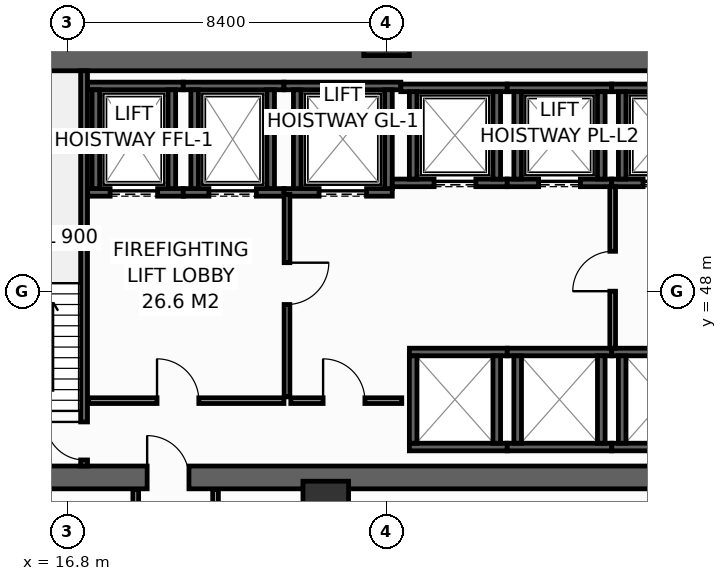
"""IFC4 building model, lengths in metres.
Left out: names, types, materials, properties, quantities, classifications, styles, units other than length and angle.
Written with IfcOpenShell. Run it as: python <this file> out.ifc"""

import sys

from ifc_helpers import new_model, si_unit, direction, frame, frame_2d, origin, origin_2d, place, context, subcontext, project, spatial, rectangle, hollow_rectangle, extrude, element, fill, save


model = new_model("IFC4")
c1 = context("Model", 3, precision=1e-05, world=origin(), true_north=direction((0.0, 1.0)))
c2 = subcontext(c1, "Body", "Model", "MODEL_VIEW")
j1 = project(units=[si_unit("LENGTHUNIT", "METRE"), si_unit("PLANEANGLEUNIT", "RADIAN")], contexts=[c1])
p1 = place(None, origin())
s1 = spatial("IfcSite", under=j1, at=p1, CompositionType="ELEMENT")
p2 = place(p1, origin())
s2 = spatial("IfcBuilding", under=s1, at=p2, CompositionType="ELEMENT")
p3 = place(p2, frame((0.0, 0.0, 73.6)))
s3 = spatial("IfcBuildingStorey", under=s2, at=p3, CompositionType="ELEMENT", Elevation=73.6)
p4 = place(p3, frame((13.5, 43.1, 0.0), z_axis=(0.0, 0.0, 1.0), x_axis=(1.0, 0.0, 0.0)))
e1 = element("IfcWall", 1, at=p4, inside=s3, PredefinedType="SHEAR", context=c2, shape_type="SweptSolid", body=[
    extrude(rectangle(XDim=32.9, YDim=0.6, at=frame_2d((16.45, 0.0))), origin(), (0.0, 0.0, 1.0), 4.15),
])
p5 = place(p4, frame((5.4, 0.0, 0.0)))
e2 = element("IfcOpeningElement", 2, at=p5, cuts=e1, PredefinedType="OPENING", context=c2, shape_type="SweptSolid", body=[
    extrude(rectangle(XDim=1.1, YDim=2.15, at=frame_2d((0.55, 1.075))), frame((0.0, 0.31, 0.0), z_axis=(0.0, -1.0, 0.0), x_axis=(1.0, 0.0, 0.0)), (0.0, 0.0, 1.0), 0.62),
])
p6 = place(p4, frame((25.6, 0.0, 0.0)))
e3 = element("IfcOpeningElement", 3, at=p6, cuts=e1, PredefinedType="OPENING", context=c2, shape_type="SweptSolid", body=[
    extrude(rectangle(XDim=1.1, YDim=2.15, at=frame_2d((0.55, 1.075))), frame((0.0, 0.31, 0.0), z_axis=(0.0, -1.0, 0.0), x_axis=(1.0, 0.0, 0.0)), (0.0, 0.0, 1.0), 0.62),
])
p7 = place(p3, frame((13.5, 54.1, 0.0), z_axis=(0.0, 0.0, 1.0), x_axis=(1.0, 0.0, 0.0)))
e4 = element("IfcWall", 4, at=p7, inside=s3, PredefinedType="SHEAR", context=c2, shape_type="SweptSolid", body=[
    extrude(rectangle(XDim=32.9, YDim=0.6, at=frame_2d((16.45, 0.0))), origin(), (0.0, 0.0, 1.0), 4.15),
])
for number, where, z_axis, x_axis in (
    (5, (25.2, 54.8, 0.0), (0.0, 0.0, 1.0), (1.0, 0.0, 0.0)),
    (6, (23.6, 42.4, 0.0), (0.0, 0.0, 1.0), (1.0, 0.0, 0.0)),
):
    element("IfcColumn", number, at=place(p3, frame(where, z_axis=z_axis, x_axis=x_axis)), inside=s3, PredefinedType="COLUMN", context=c2, shape_type="SweptSolid", body=[
        extrude(hollow_rectangle(XDim=1.2, YDim=1.2, WallThickness=0.055, at=origin_2d()), origin(), (0.0, 0.0, 1.0), 4.4),
    ])
p8 = place(p3, frame((17.33, 50.6, 0.0), z_axis=(0.0, 0.0, 1.0), x_axis=(1.0, 0.0, 0.0)))
e7 = element("IfcWall", 7, at=p8, inside=s3, PredefinedType="SHEAR", context=c2, shape_type="SweptSolid", body=[
    extrude(rectangle(XDim=2.52, YDim=0.2, at=frame_2d((1.26, 0.0))), origin(), (0.0, 0.0, 1.0), 4.15),
])
p9 = place(p8, frame((0.595, 0.0, 0.0)))
e8 = element("IfcOpeningElement", 8, at=p9, cuts=e7, PredefinedType="OPENING", context=c2, shape_type="SweptSolid", body=[
    extrude(rectangle(XDim=1.25, YDim=2.3, at=frame_2d((0.625, 1.15))), frame((0.0, 0.11, 0.0), z_axis=(0.0, -1.0, 0.0), x_axis=(1.0, 0.0, 0.0)), (0.0, 0.0, 1.0), 0.22),
])
p10 = place(p3, frame((17.33, 53.4, 0.0), z_axis=(0.0, 0.0, 1.0), x_axis=(1.0, 0.0, 0.0)))
e9 = element("IfcWall", 9, at=p10, inside=s3, PredefinedType="SHEAR", context=c2, shape_type="SweptSolid", body=[
    extrude(rectangle(XDim=2.52, YDim=0.2, at=frame_2d((1.26, 0.0))), origin(), (0.0, 0.0, 1.0), 4.15),
])
for number, where, z_axis, x_axis in (
    (10, (17.55, 50.7, 0.0), (0.0, 0.0, 1.0), (0.0, 1.0, 0.0)),
    (11, (19.55, 50.7, 0.0), (0.0, 0.0, 1.0), (0.0, 1.0, 0.0)),
):
    element("IfcWall", number, at=place(p3, frame(where, z_axis=z_axis, x_axis=x_axis)), inside=s3, PredefinedType="SHEAR", context=c2, shape_type="SweptSolid", body=[
        extrude(rectangle(XDim=2.6, YDim=0.2, at=frame_2d((1.3, 0.0))), origin(), (0.0, 0.0, 1.0), 4.15),
    ])
p11 = place(p3, frame((19.85, 50.6, 0.0), z_axis=(0.0, 0.0, 1.0), x_axis=(1.0, 0.0, 0.0)))
e12 = element("IfcWall", 12, at=p11, inside=s3, PredefinedType="SHEAR", context=c2, shape_type="SweptSolid", body=[
    extrude(rectangle(XDim=2.65, YDim=0.2, at=frame_2d((1.325, 0.0))), origin(), (0.0, 0.0, 1.0), 4.15),
])
p12 = place(p11, frame((0.675, 0.0, 0.0)))
e13 = element("IfcOpeningElement", 13, at=p12, cuts=e12, PredefinedType="OPENING", context=c2, shape_type="SweptSolid", body=[
    extrude(rectangle(XDim=1.25, YDim=2.3, at=frame_2d((0.625, 1.15))), frame((0.0, 0.11, 0.0), z_axis=(0.0, -1.0, 0.0), x_axis=(1.0, 0.0, 0.0)), (0.0, 0.0, 1.0), 0.22),
])
p13 = place(p3, frame((19.85, 53.4, 0.0), z_axis=(0.0, 0.0, 1.0), x_axis=(1.0, 0.0, 0.0)))
e14 = element("IfcWall", 14, at=p13, inside=s3, PredefinedType="SHEAR", context=c2, shape_type="SweptSolid", body=[
    extrude(rectangle(XDim=2.65, YDim=0.2, at=frame_2d((1.325, 0.0))), origin(), (0.0, 0.0, 1.0), 4.15),
])
for number, where, z_axis, x_axis in (
    (15, (20.15, 50.7, 0.0), (0.0, 0.0, 1.0), (0.0, 1.0, 0.0)),
    (16, (22.15, 50.7, 0.0), (0.0, 0.0, 1.0), (0.0, 1.0, 0.0)),
):
    element("IfcWall", number, at=place(p3, frame(where, z_axis=z_axis, x_axis=x_axis)), inside=s3, PredefinedType="SHEAR", context=c2, shape_type="SweptSolid", body=[
        extrude(rectangle(XDim=2.6, YDim=0.2, at=frame_2d((1.3, 0.0))), origin(), (0.0, 0.0, 1.0), 4.15),
    ])
p14 = place(p3, frame((22.5, 50.6, 0.0), z_axis=(0.0, 0.0, 1.0), x_axis=(1.0, 0.0, 0.0)))
e17 = element("IfcWall", 17, at=p14, inside=s3, PredefinedType="SHEAR", context=c2, shape_type="SweptSolid", body=[
    extrude(rectangle(XDim=2.85, YDim=0.2, at=frame_2d((1.425, 0.0))), origin(), (0.0, 0.0, 1.0), 4.15),
])
p15 = place(p14, frame((0.925, 0.0, 0.0)))
e18 = element("IfcOpeningElement", 18, at=p15, cuts=e17, PredefinedType="OPENING", context=c2, shape_type="SweptSolid", body=[
    extrude(rectangle(XDim=1.25, YDim=2.3, at=frame_2d((0.625, 1.15))), frame((0.0, 0.11, 0.0), z_axis=(0.0, -1.0, 0.0), x_axis=(1.0, 0.0, 0.0)), (0.0, 0.0, 1.0), 0.22),
])
p16 = place(p3, frame((22.5, 53.4, 0.0), z_axis=(0.0, 0.0, 1.0), x_axis=(1.0, 0.0, 0.0)))
e19 = element("IfcWall", 19, at=p16, inside=s3, PredefinedType="SHEAR", context=c2, shape_type="SweptSolid", body=[
    extrude(rectangle(XDim=3.075, YDim=0.2, at=frame_2d((1.538, 0.0))), origin(), (0.0, 0.0, 1.0), 4.15),
])
for number, where, z_axis, x_axis in (
    (20, (22.85, 50.7, 0.0), (0.0, 0.0, 1.0), (0.0, 1.0, 0.0)),
    (21, (25.25, 50.7, 0.0), (0.0, 0.0, 1.0), (0.0, 1.0, 0.0)),
):
    element("IfcWall", number, at=place(p3, frame(where, z_axis=z_axis, x_axis=x_axis)), inside=s3, PredefinedType="SHEAR", context=c2, shape_type="SweptSolid", body=[
        extrude(rectangle(XDim=2.6, YDim=0.2, at=frame_2d((1.3, 0.0))), origin(), (0.0, 0.0, 1.0), 4.15),
    ])
p17 = place(p3, frame((25.35, 50.85, 0.0), z_axis=(0.0, 0.0, 1.0), x_axis=(1.0, 0.0, 0.0)))
e22 = element("IfcWall", 22, at=p17, inside=s3, PredefinedType="SHEAR", context=c2, shape_type="SweptSolid", body=[
    extrude(rectangle(XDim=3.025, YDim=0.2, at=frame_2d((1.512, 0.0))), origin(), (0.0, 0.0, 1.0), 4.15),
])
p18 = place(p17, frame((1.1, 0.0, 0.0)))
e23 = element("IfcOpeningElement", 23, at=p18, cuts=e22, PredefinedType="OPENING", context=c2, shape_type="SweptSolid", body=[
    extrude(rectangle(XDim=1.1, YDim=2.2, at=frame_2d((0.55, 1.1))), frame((0.0, 0.11, 0.0), z_axis=(0.0, -1.0, 0.0), x_axis=(1.0, 0.0, 0.0)), (0.0, 0.0, 1.0), 0.22),
])
p19 = place(p3, frame((25.575, 53.35, 0.0), z_axis=(0.0, 0.0, 1.0), x_axis=(1.0, 0.0, 0.0)))
e24 = element("IfcWall", 24, at=p19, inside=s3, PredefinedType="SHEAR", context=c2, shape_type="SweptSolid", body=[
    extrude(rectangle(XDim=2.8, YDim=0.2, at=frame_2d((1.4, 0.0))), origin(), (0.0, 0.0, 1.0), 4.15),
])
for number, where, z_axis, x_axis in (
    (25, (25.9, 50.95, 0.0), (0.0, 0.0, 1.0), (0.0, 1.0, 0.0)),
    (26, (28.1, 50.95, 0.0), (0.0, 0.0, 1.0), (0.0, 1.0, 0.0)),
):
    element("IfcWall", number, at=place(p3, frame(where, z_axis=z_axis, x_axis=x_axis)), inside=s3, PredefinedType="SHEAR", context=c2, shape_type="SweptSolid", body=[
        extrude(rectangle(XDim=2.3, YDim=0.2, at=frame_2d((1.15, 0.0))), origin(), (0.0, 0.0, 1.0), 4.15),
    ])
p20 = place(p3, frame((28.375, 50.85, 0.0), z_axis=(0.0, 0.0, 1.0), x_axis=(1.0, 0.0, 0.0)))
e27 = element("IfcWall", 27, at=p20, inside=s3, PredefinedType="SHEAR", context=c2, shape_type="SweptSolid", body=[
    extrude(rectangle(XDim=2.75, YDim=0.2, at=frame_2d((1.375, 0.0))), origin(), (0.0, 0.0, 1.0), 4.15),
])
p21 = place(p20, frame((0.825, 0.0, 0.0)))
e28 = element("IfcOpeningElement", 28, at=p21, cuts=e27, PredefinedType="OPENING", context=c2, shape_type="SweptSolid", body=[
    extrude(rectangle(XDim=1.1, YDim=2.2, at=frame_2d((0.55, 1.1))), frame((0.0, 0.11, 0.0), z_axis=(0.0, -1.0, 0.0), x_axis=(1.0, 0.0, 0.0)), (0.0, 0.0, 1.0), 0.22),
])
p22 = place(p3, frame((28.375, 53.35, 0.0), z_axis=(0.0, 0.0, 1.0), x_axis=(1.0, 0.0, 0.0)))
e29 = element("IfcWall", 29, at=p22, inside=s3, PredefinedType="SHEAR", context=c2, shape_type="SweptSolid", body=[
    extrude(rectangle(XDim=2.75, YDim=0.2, at=frame_2d((1.375, 0.0))), origin(), (0.0, 0.0, 1.0), 4.15),
])
for number, where, z_axis, x_axis in (
    (30, (28.65, 50.95, 0.0), (0.0, 0.0, 1.0), (0.0, 1.0, 0.0)),
    (31, (30.85, 50.95, 0.0), (0.0, 0.0, 1.0), (0.0, 1.0, 0.0)),
):
    element("IfcWall", number, at=place(p3, frame(where, z_axis=z_axis, x_axis=x_axis)), inside=s3, PredefinedType="SHEAR", context=c2, shape_type="SweptSolid", body=[
        extrude(rectangle(XDim=2.3, YDim=0.2, at=frame_2d((1.15, 0.0))), origin(), (0.0, 0.0, 1.0), 4.15),
    ])
p23 = place(p3, frame((31.125, 50.85, 0.0), z_axis=(0.0, 0.0, 1.0), x_axis=(1.0, 0.0, 0.0)))
e32 = element("IfcWall", 32, at=p23, inside=s3, PredefinedType="SHEAR", context=c2, shape_type="SweptSolid", body=[
    extrude(rectangle(XDim=2.825, YDim=0.2, at=frame_2d((1.413, 0.0))), origin(), (0.0, 0.0, 1.0), 4.15),
])
p24 = place(p23, frame((0.825, 0.0, 0.0)))
e33 = element("IfcOpeningElement", 33, at=p24, cuts=e32, PredefinedType="OPENING", context=c2, shape_type="SweptSolid", body=[
    extrude(rectangle(XDim=1.1, YDim=2.2, at=frame_2d((0.55, 1.1))), frame((0.0, 0.11, 0.0), z_axis=(0.0, -1.0, 0.0), x_axis=(1.0, 0.0, 0.0)), (0.0, 0.0, 1.0), 0.22),
])
p25 = place(p3, frame((31.125, 53.35, 0.0), z_axis=(0.0, 0.0, 1.0), x_axis=(1.0, 0.0, 0.0)))
e34 = element("IfcWall", 34, at=p25, inside=s3, PredefinedType="SHEAR", context=c2, shape_type="SweptSolid", body=[
    extrude(rectangle(XDim=2.825, YDim=0.2, at=frame_2d((1.413, 0.0))), origin(), (0.0, 0.0, 1.0), 4.15),
])
p26 = place(p3, frame((31.4, 50.95, 0.0), z_axis=(0.0, 0.0, 1.0), x_axis=(0.0, 1.0, 0.0)))
e35 = element("IfcWall", 35, at=p26, inside=s3, PredefinedType="SHEAR", context=c2, shape_type="SweptSolid", body=[
    extrude(rectangle(XDim=2.3, YDim=0.2, at=frame_2d((1.15, 0.0))), origin(), (0.0, 0.0, 1.0), 4.15),
])
for number, where, z_axis, x_axis in (
    (36, (25.8, 43.9, 0.0), (0.0, 0.0, 1.0), (1.0, 0.0, 0.0)),
    (37, (25.8, 46.4, 0.0), (0.0, 0.0, 1.0), (1.0, 0.0, 0.0)),
):
    element("IfcWall", number, at=place(p3, frame(where, z_axis=z_axis, x_axis=x_axis)), inside=s3, PredefinedType="SHEAR", context=c2, shape_type="SweptSolid", body=[
        extrude(rectangle(XDim=2.575, YDim=0.2, at=frame_2d((1.288, 0.0))), origin(), (0.0, 0.0, 1.0), 4.15),
    ])
for number, where, z_axis, x_axis in (
    (38, (25.9, 44.0, 0.0), (0.0, 0.0, 1.0), (0.0, 1.0, 0.0)),
    (39, (28.1, 44.0, 0.0), (0.0, 0.0, 1.0), (0.0, 1.0, 0.0)),
):
    element("IfcWall", number, at=place(p3, frame(where, z_axis=z_axis, x_axis=x_axis)), inside=s3, PredefinedType="SHEAR", context=c2, shape_type="SweptSolid", body=[
        extrude(rectangle(XDim=2.3, YDim=0.2, at=frame_2d((1.15, 0.0))), origin(), (0.0, 0.0, 1.0), 4.15),
    ])
for number, where, z_axis, x_axis in (
    (40, (28.375, 43.9, 0.0), (0.0, 0.0, 1.0), (1.0, 0.0, 0.0)),
    (41, (28.375, 46.4, 0.0), (0.0, 0.0, 1.0), (1.0, 0.0, 0.0)),
):
    element("IfcWall", number, at=place(p3, frame(where, z_axis=z_axis, x_axis=x_axis)), inside=s3, PredefinedType="SHEAR", context=c2, shape_type="SweptSolid", body=[
        extrude(rectangle(XDim=2.75, YDim=0.2, at=frame_2d((1.375, 0.0))), origin(), (0.0, 0.0, 1.0), 4.15),
    ])
for number, where, z_axis, x_axis in (
    (42, (28.65, 44.0, 0.0), (0.0, 0.0, 1.0), (0.0, 1.0, 0.0)),
    (43, (30.85, 44.0, 0.0), (0.0, 0.0, 1.0), (0.0, 1.0, 0.0)),
):
    element("IfcWall", number, at=place(p3, frame(where, z_axis=z_axis, x_axis=x_axis)), inside=s3, PredefinedType="SHEAR", context=c2, shape_type="SweptSolid", body=[
        extrude(rectangle(XDim=2.3, YDim=0.2, at=frame_2d((1.15, 0.0))), origin(), (0.0, 0.0, 1.0), 4.15),
    ])
for number, where, z_axis, x_axis in (
    (44, (31.125, 43.9, 0.0), (0.0, 0.0, 1.0), (1.0, 0.0, 0.0)),
    (45, (31.125, 46.4, 0.0), (0.0, 0.0, 1.0), (1.0, 0.0, 0.0)),
):
    element("IfcWall", number, at=place(p3, frame(where, z_axis=z_axis, x_axis=x_axis)), inside=s3, PredefinedType="SHEAR", context=c2, shape_type="SweptSolid", body=[
        extrude(rectangle(XDim=2.575, YDim=0.2, at=frame_2d((1.288, 0.0))), origin(), (0.0, 0.0, 1.0), 4.15),
    ])
p27 = place(p3, frame((31.4, 44.0, 0.0), z_axis=(0.0, 0.0, 1.0), x_axis=(0.0, 1.0, 0.0)))
e46 = element("IfcWall", 46, at=p27, inside=s3, PredefinedType="SHEAR", context=c2, shape_type="SweptSolid", body=[
    extrude(rectangle(XDim=2.3, YDim=0.2, at=frame_2d((1.15, 0.0))), origin(), (0.0, 0.0, 1.0), 4.15),
])
p28 = place(p3, frame((17.24, 43.4, 0.0), z_axis=(0.0, 0.0, 1.0), x_axis=(0.0, 1.0, 0.0)))
e47 = element("IfcWall", 47, at=p28, inside=s3, PredefinedType="SHEAR", context=c2, shape_type="SweptSolid", body=[
    extrude(rectangle(XDim=10.4, YDim=0.18, at=frame_2d((5.2, 0.0))), origin(), (0.0, 0.0, 1.0), 4.15),
])
p29 = place(p28, frame((0.16, 0.0, 0.0)))
e48 = element("IfcOpeningElement", 48, at=p29, cuts=e47, PredefinedType="OPENING", context=c2, shape_type="SweptSolid", body=[
    extrude(rectangle(XDim=1.0, YDim=2.15, at=frame_2d((0.5, 1.075))), frame((0.0, 0.1, 0.0), z_axis=(0.0, -1.0, 0.0), x_axis=(1.0, 0.0, 0.0)), (0.0, 0.0, 1.0), 0.2),
])
p30 = place(p3, frame((17.36, 45.12, 0.0), z_axis=(0.0, 0.0, 1.0), x_axis=(1.0, 0.0, 0.0)))
e49 = element("IfcWall", 49, at=p30, inside=s3, PredefinedType="PARTITIONING", context=c2, shape_type="SweptSolid", body=[
    extrude(rectangle(XDim=5.14, YDim=0.15, at=frame_2d((2.57, 0.0))), origin(), (0.0, 0.0, 1.0), 4.15),
])
p31 = place(p30, frame((1.8, 0.0, 0.0)))
e50 = element("IfcOpeningElement", 50, at=p31, cuts=e49, PredefinedType="OPENING", context=c2, shape_type="SweptSolid", body=[
    extrude(rectangle(XDim=1.1, YDim=2.15, at=frame_2d((0.55, 1.075))), frame((0.0, 0.085, 0.0), z_axis=(0.0, -1.0, 0.0), x_axis=(1.0, 0.0, 0.0)), (0.0, 0.0, 1.0), 0.17),
])
p32 = place(p3, frame((22.58, 50.55, 0.0), z_axis=(0.0, 0.0, 1.0), x_axis=(0.0, -1.0, 0.0)))
e51 = element("IfcWall", 51, at=p32, inside=s3, PredefinedType="PARTITIONING", context=c2, shape_type="SweptSolid", body=[
    extrude(rectangle(XDim=5.33, YDim=0.15, at=frame_2d((2.665, 0.0))), origin(), (0.0, 0.0, 1.0), 4.15),
])
p33 = place(p32, frame((1.8, 0.0, 0.0)))
e52 = element("IfcOpeningElement", 52, at=p33, cuts=e51, PredefinedType="OPENING", context=c2, shape_type="SweptSolid", body=[
    extrude(rectangle(XDim=1.1, YDim=2.15, at=frame_2d((0.55, 1.075))), frame((0.0, 0.085, 0.0), z_axis=(0.0, -1.0, 0.0), x_axis=(1.0, 0.0, 0.0)), (0.0, 0.0, 1.0), 0.17),
])
p34 = place(p3, frame((22.68, 45.12, 0.0), z_axis=(0.0, 0.0, 1.0), x_axis=(1.0, 0.0, 0.0)))
e53 = element("IfcWall", 53, at=p34, inside=s3, PredefinedType="PARTITIONING", context=c2, shape_type="SweptSolid", body=[
    extrude(rectangle(XDim=2.92, YDim=0.15, at=frame_2d((1.46, 0.0))), origin(), (0.0, 0.0, 1.0), 4.15),
])
p35 = place(p34, frame((0.85, 0.0, 0.0)))
e54 = element("IfcOpeningElement", 54, at=p35, cuts=e53, PredefinedType="OPENING", context=c2, shape_type="SweptSolid", body=[
    extrude(rectangle(XDim=1.1, YDim=2.15, at=frame_2d((0.55, 1.075))), frame((0.0, 0.085, 0.0), z_axis=(0.0, -1.0, 0.0), x_axis=(1.0, 0.0, 0.0)), (0.0, 0.0, 1.0), 0.17),
])
p36 = place(p3, frame((31.15, 46.5, 0.0), z_axis=(0.0, 0.0, 1.0), x_axis=(0.0, 1.0, 0.0)))
e55 = element("IfcWall", 55, at=p36, inside=s3, PredefinedType="PARTITIONING", context=c2, shape_type="SweptSolid", body=[
    extrude(rectangle(XDim=4.25, YDim=0.15, at=frame_2d((2.125, 0.0))), origin(), (0.0, 0.0, 1.0), 4.15),
])
p37 = place(p36, frame((1.5, 0.0, 0.0)))
e56 = element("IfcOpeningElement", 56, at=p37, cuts=e55, PredefinedType="OPENING", context=c2, shape_type="SweptSolid", body=[
    extrude(rectangle(XDim=1.05, YDim=2.15, at=frame_2d((0.525, 1.075))), frame((0.0, 0.085, 0.0), z_axis=(0.0, -1.0, 0.0), x_axis=(1.0, 0.0, 0.0)), (0.0, 0.0, 1.0), 0.17),
])
for number, where, z_axis, x_axis in (
    (57, (18.6, 40.85, 0.0), (0.0, 0.0, 1.0), (0.0, 1.0, 0.0)),
    (58, (20.7, 40.85, 0.0), (0.0, 0.0, 1.0), (0.0, 1.0, 0.0)),
):
    element("IfcWall", number, at=place(p3, frame(where, z_axis=z_axis, x_axis=x_axis)), inside=s3, PredefinedType="PARTITIONING", context=c2, shape_type="SweptSolid", body=[
        extrude(rectangle(XDim=1.93, YDim=0.15, at=frame_2d((0.965, 0.0))), origin(), (0.0, 0.0, 1.0), 4.15),
    ])
p38 = place(p9, origin())
e59 = element("IfcDoor", 59, at=p38, inside=s3, OperationType="SLIDING_TO_LEFT", PredefinedType="DOOR", context=c2, shape_type="SweptSolid", body=[
    extrude(rectangle(XDim=1.25, YDim=2.3, at=frame_2d((0.625, 1.15))), frame((0.0, 0.025, 0.0), z_axis=(0.0, -1.0, 0.0), x_axis=(1.0, 0.0, 0.0)), (0.0, 0.0, 1.0), 0.05),
])
fill(e8, e59)
p39 = place(p12, origin())
e60 = element("IfcDoor", 60, at=p39, inside=s3, OperationType="SLIDING_TO_LEFT", PredefinedType="DOOR", context=c2, shape_type="SweptSolid", body=[
    extrude(rectangle(XDim=1.25, YDim=2.3, at=frame_2d((0.625, 1.15))), frame((0.0, 0.025, 0.0), z_axis=(0.0, -1.0, 0.0), x_axis=(1.0, 0.0, 0.0)), (0.0, 0.0, 1.0), 0.05),
])
fill(e13, e60)
p40 = place(p15, origin())
e61 = element("IfcDoor", 61, at=p40, inside=s3, OperationType="SLIDING_TO_LEFT", PredefinedType="DOOR", context=c2, shape_type="SweptSolid", body=[
    extrude(rectangle(XDim=1.25, YDim=2.3, at=frame_2d((0.625, 1.15))), frame((0.0, 0.025, 0.0), z_axis=(0.0, -1.0, 0.0), x_axis=(1.0, 0.0, 0.0)), (0.0, 0.0, 1.0), 0.05),
])
fill(e18, e61)
p41 = place(p18, origin())
e62 = element("IfcDoor", 62, at=p41, inside=s3, OperationType="SLIDING_TO_LEFT", PredefinedType="DOOR", context=c2, shape_type="SweptSolid", body=[
    extrude(rectangle(XDim=1.1, YDim=2.2, at=frame_2d((0.55, 1.1))), frame((0.0, 0.025, 0.0), z_axis=(0.0, -1.0, 0.0), x_axis=(1.0, 0.0, 0.0)), (0.0, 0.0, 1.0), 0.05),
])
fill(e23, e62)
p42 = place(p21, origin())
e63 = element("IfcDoor", 63, at=p42, inside=s3, OperationType="SLIDING_TO_LEFT", PredefinedType="DOOR", context=c2, shape_type="SweptSolid", body=[
    extrude(rectangle(XDim=1.1, YDim=2.2, at=frame_2d((0.55, 1.1))), frame((0.0, 0.025, 0.0), z_axis=(0.0, -1.0, 0.0), x_axis=(1.0, 0.0, 0.0)), (0.0, 0.0, 1.0), 0.05),
])
fill(e28, e63)
p43 = place(p24, origin())
e64 = element("IfcDoor", 64, at=p43, inside=s3, OperationType="SLIDING_TO_LEFT", PredefinedType="DOOR", context=c2, shape_type="SweptSolid", body=[
    extrude(rectangle(XDim=1.1, YDim=2.2, at=frame_2d((0.55, 1.1))), frame((0.0, 0.025, 0.0), z_axis=(0.0, -1.0, 0.0), x_axis=(1.0, 0.0, 0.0)), (0.0, 0.0, 1.0), 0.05),
])
fill(e33, e64)
p44 = place(p29, origin())
e65 = element("IfcDoor", 65, at=p44, inside=s3, OperationType="SINGLE_SWING_RIGHT", PredefinedType="DOOR", context=c2, shape_type="SweptSolid", body=[
    extrude(rectangle(XDim=1.0, YDim=2.15, at=frame_2d((0.5, 1.075))), frame((0.0, 0.025, 0.0), z_axis=(0.0, -1.0, 0.0), x_axis=(1.0, 0.0, 0.0)), (0.0, 0.0, 1.0), 0.05),
])
fill(e48, e65)
p45 = place(p31, origin())
e66 = element("IfcDoor", 66, at=p45, inside=s3, OperationType="SINGLE_SWING_LEFT", PredefinedType="DOOR", context=c2, shape_type="SweptSolid", body=[
    extrude(rectangle(XDim=1.1, YDim=2.15, at=frame_2d((0.55, 1.075))), frame((0.0, 0.025, 0.0), z_axis=(0.0, -1.0, 0.0), x_axis=(1.0, 0.0, 0.0)), (0.0, 0.0, 1.0), 0.05),
])
fill(e50, e66)
p46 = place(p33, origin())
e67 = element("IfcDoor", 67, at=p46, inside=s3, OperationType="SINGLE_SWING_LEFT", PredefinedType="DOOR", context=c2, shape_type="SweptSolid", body=[
    extrude(rectangle(XDim=1.1, YDim=2.15, at=frame_2d((0.55, 1.075))), frame((0.0, 0.025, 0.0), z_axis=(0.0, -1.0, 0.0), x_axis=(1.0, 0.0, 0.0)), (0.0, 0.0, 1.0), 0.05),
])
fill(e52, e67)
p47 = place(p35, origin())
e68 = element("IfcDoor", 68, at=p47, inside=s3, OperationType="SINGLE_SWING_LEFT", PredefinedType="DOOR", context=c2, shape_type="SweptSolid", body=[
    extrude(rectangle(XDim=1.1, YDim=2.15, at=frame_2d((0.55, 1.075))), frame((0.0, 0.025, 0.0), z_axis=(0.0, -1.0, 0.0), x_axis=(1.0, 0.0, 0.0)), (0.0, 0.0, 1.0), 0.05),
])
fill(e54, e68)
p48 = place(p5, origin())
e69 = element("IfcDoor", 69, at=p48, inside=s3, OperationType="SINGLE_SWING_LEFT", PredefinedType="DOOR", context=c2, shape_type="SweptSolid", body=[
    extrude(rectangle(XDim=1.1, YDim=2.15, at=frame_2d((0.55, 1.075))), frame((0.0, 0.025, 0.0), z_axis=(0.0, -1.0, 0.0), x_axis=(1.0, 0.0, 0.0)), (0.0, 0.0, 1.0), 0.05),
])
fill(e2, e69)
p49 = place(p37, origin())
e70 = element("IfcDoor", 70, at=p49, inside=s3, OperationType="SINGLE_SWING_LEFT", PredefinedType="DOOR", context=c2, shape_type="SweptSolid", body=[
    extrude(rectangle(XDim=1.05, YDim=2.15, at=frame_2d((0.525, 1.075))), frame((0.0, 0.025, 0.0), z_axis=(0.0, -1.0, 0.0), x_axis=(1.0, 0.0, 0.0)), (0.0, 0.0, 1.0), 0.05),
])
fill(e56, e70)
save(model, sys.argv[1])
